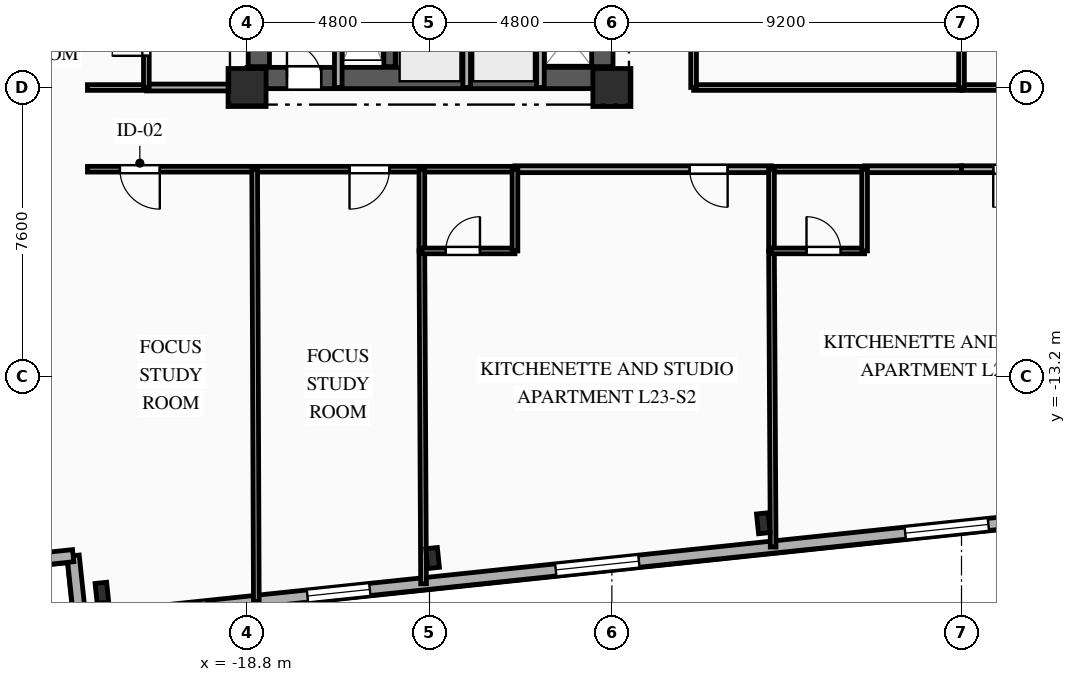
"""IFC4 building model, lengths in metres.
Left out: names, types, materials, properties, quantities, classifications, styles, units other than length and angle.
Written with IfcOpenShell. Run it as: python <this file> out.ifc"""

import sys

from ifc_helpers import new_model, si_unit, direction, frame, frame_2d, origin, origin_2d, place, context, subcontext, project, spatial, rectangle, i_section, extrude, element, fill, save


model = new_model("IFC4")
c1 = context("Model", 3, precision=1e-05, world=origin(), true_north=direction((0.0, 1.0)))
c2 = subcontext(c1, "Body", "Model", "MODEL_VIEW")
j1 = project(units=[si_unit("LENGTHUNIT", "METRE"), si_unit("PLANEANGLEUNIT", "RADIAN")], contexts=[c1])
p1 = place(None, origin())
s1 = spatial("IfcSite", under=j1, at=p1, CompositionType="ELEMENT")
p2 = place(p1, origin())
s2 = spatial("IfcBuilding", under=s1, at=p2, CompositionType="ELEMENT")
p3 = place(p2, frame((0.0, 0.0, 85.7)))
s3 = spatial("IfcBuildingStorey", under=s2, at=p3, CompositionType="ELEMENT", Elevation=85.7)
for number, where, z_axis, x_axis in (
    (1, (-18.8, -5.6, 0.0), (0.0, 0.0, 1.0), (1.0, 0.0, 0.0)),
    (2, (-9.2, -5.6, 0.0), (0.0, 0.0, 1.0), (1.0, 0.0, 0.0)),
):
    element("IfcColumn", number, at=place(p3, frame(where, z_axis=z_axis, x_axis=x_axis)), inside=s3, PredefinedType="COLUMN", context=c2, shape_type="SweptSolid", body=[
        extrude(rectangle(XDim=1.0, YDim=1.0, at=origin_2d()), origin(), (0.0, 0.0, 1.0), 3.35),
    ])
for number, where, z_axis, x_axis in (
    (3, (-22.619, -18.895, 0.0), (0.0, 0.0, 1.0), (0.995, 0.105, 0.0)),
    (4, (-13.917, -17.98, 0.0), (0.0, 0.0, 1.0), (0.995, 0.105, 0.0)),
    (5, (-5.215, -17.066, 0.0), (0.0, 0.0, 1.0), (0.995, 0.105, 0.0)),
):
    element("IfcColumn", number, at=place(p3, frame(where, z_axis=z_axis, x_axis=x_axis)), inside=s3, PredefinedType="COLUMN", context=c2, shape_type="SweptSolid", body=[
        extrude(i_section(OverallWidth=0.306, OverallDepth=0.524, WebThickness=0.021, FlangeThickness=0.04, FilletRadius=0.027, at=origin_2d()), origin(), (0.0, 0.0, 1.0), 3.35),
    ])
for number, where, z_axis, x_axis in (
    (6, (-23.198, -19.609, 0.0), (0.0, 0.0, 1.0), (-0.105, 0.995, 0.0)),
    (7, (-23.376, -17.919, 0.0), (0.0, 0.0, 1.0), (-0.995, -0.105, 0.0)),
):
    element("IfcWall", number, at=place(p3, frame(where, z_axis=z_axis, x_axis=x_axis)), inside=s3, PredefinedType="SOLIDWALL", context=c2, shape_type="SweptSolid", body=[
        extrude(rectangle(XDim=1.7, YDim=0.32, at=frame_2d((0.85, 0.0))), origin(), (0.0, 0.0, 1.0), 3.045),
    ])
p4 = place(p3, frame((30.307, -13.986, 0.0), z_axis=(0.0, 0.0, 1.0), x_axis=(-0.994521628355, -0.104531003701, 0.0)))
e8 = element("IfcWall", 8, at=p4, inside=s3, PredefinedType="SOLIDWALL", context=c2, shape_type="SweptSolid", body=[
    extrude(rectangle(XDim=53.8, YDim=0.32, at=frame_2d((26.9, 0.0))), origin(), (0.0, 0.0, 1.0), 3.045),
])
p5 = place(p4, frame((11.344, 0.0, 0.85)))
e9 = element("IfcOpeningElement", 9, at=p5, cuts=e8, PredefinedType="OPENING", context=c2, shape_type="SweptSolid", body=[
    extrude(rectangle(XDim=1.65, YDim=1.85, at=frame_2d((0.825, 0.925))), frame((0.0, 0.17, 0.0), z_axis=(0.0, -1.0, 0.0), x_axis=(1.0, 0.0, 0.0)), (0.0, 0.0, 1.0), 0.34),
])
p6 = place(p4, frame((20.516, 0.0, 0.85)))
e10 = element("IfcOpeningElement", 10, at=p6, cuts=e8, PredefinedType="OPENING", context=c2, shape_type="SweptSolid", body=[
    extrude(rectangle(XDim=2.2, YDim=1.85, at=frame_2d((1.1, 0.925))), frame((0.0, 0.17, 0.0), z_axis=(0.0, -1.0, 0.0), x_axis=(1.0, 0.0, 0.0)), (0.0, 0.0, 1.0), 0.34),
])
p7 = place(p4, frame((29.763, 0.0, 0.85)))
e11 = element("IfcOpeningElement", 11, at=p7, cuts=e8, PredefinedType="OPENING", context=c2, shape_type="SweptSolid", body=[
    extrude(rectangle(XDim=2.2, YDim=1.85, at=frame_2d((1.1, 0.925))), frame((0.0, 0.17, 0.0), z_axis=(0.0, -1.0, 0.0), x_axis=(1.0, 0.0, 0.0)), (0.0, 0.0, 1.0), 0.34),
])
p8 = place(p4, frame((39.01, 0.0, 0.85)))
e12 = element("IfcOpeningElement", 12, at=p8, cuts=e8, PredefinedType="OPENING", context=c2, shape_type="SweptSolid", body=[
    extrude(rectangle(XDim=2.2, YDim=1.85, at=frame_2d((1.1, 0.925))), frame((0.0, 0.17, 0.0), z_axis=(0.0, -1.0, 0.0), x_axis=(1.0, 0.0, 0.0)), (0.0, 0.0, 1.0), 0.34),
])
p9 = place(p4, frame((46.13, 0.0, 0.85)))
e13 = element("IfcOpeningElement", 13, at=p9, cuts=e8, PredefinedType="OPENING", context=c2, shape_type="SweptSolid", body=[
    extrude(rectangle(XDim=1.65, YDim=1.85, at=frame_2d((0.825, 0.925))), frame((0.0, 0.17, 0.0), z_axis=(0.0, -1.0, 0.0), x_axis=(1.0, 0.0, 0.0)), (0.0, 0.0, 1.0), 0.34),
])
p10 = place(p4, frame((50.453, 0.0, 0.85)))
e14 = element("IfcOpeningElement", 14, at=p10, cuts=e8, PredefinedType="OPENING", context=c2, shape_type="SweptSolid", body=[
    extrude(rectangle(XDim=1.65, YDim=1.85, at=frame_2d((0.825, 0.925))), frame((0.0, 0.17, 0.0), z_axis=(0.0, -1.0, 0.0), x_axis=(1.0, 0.0, 0.0)), (0.0, 0.0, 1.0), 0.34),
])
p11 = place(p3, frame((-18.8, -5.35, 0.0), z_axis=(0.0, 0.0, 1.0), x_axis=(1.0, 0.0, 0.0)))
e15 = element("IfcWall", 15, at=p11, inside=s3, PredefinedType="SHEAR", context=c2, shape_type="SweptSolid", body=[
    extrude(rectangle(XDim=9.6, YDim=0.56, at=frame_2d((4.8, 0.0))), origin(), (0.0, 0.0, 1.0), 3.045),
])
p12 = place(p11, frame((1.05, 0.0, 0.0)))
e16 = element("IfcOpeningElement", 16, at=p12, cuts=e15, PredefinedType="OPENING", context=c2, shape_type="SweptSolid", body=[
    extrude(rectangle(XDim=0.9, YDim=2.1, at=frame_2d((0.45, 1.05))), frame((0.0, 0.29, 0.0), z_axis=(0.0, -1.0, 0.0), x_axis=(1.0, 0.0, 0.0)), (0.0, 0.0, 1.0), 0.58),
])
p13 = place(p3, frame((-18.49, -5.05, 0.0), z_axis=(0.0, 0.0, 1.0), x_axis=(0.0, 1.0, 0.0)))
e17 = element("IfcWall", 17, at=p13, inside=s3, PredefinedType="SHEAR", context=c2, shape_type="SweptSolid", body=[
    extrude(rectangle(XDim=10.1, YDim=0.56, at=frame_2d((5.05, 0.0))), origin(), (0.0, 0.0, 1.0), 3.045),
])
p14 = place(p3, frame((-9.45, -5.05, 0.0), z_axis=(0.0, 0.0, 1.0), x_axis=(0.0, 1.0, 0.0)))
e18 = element("IfcWall", 18, at=p14, inside=s3, PredefinedType="SHEAR", context=c2, shape_type="SweptSolid", body=[
    extrude(rectangle(XDim=10.1, YDim=0.56, at=frame_2d((5.05, 0.0))), origin(), (0.0, 0.0, 1.0), 3.045),
])
p15 = place(p14, frame((7.175, 0.0, 0.0)))
e19 = element("IfcOpeningElement", 19, at=p15, cuts=e18, PredefinedType="OPENING", context=c2, shape_type="SweptSolid", body=[
    extrude(rectangle(XDim=0.9, YDim=2.1, at=frame_2d((0.45, 1.05))), frame((0.0, 0.29, 0.0), z_axis=(0.0, -1.0, 0.0), x_axis=(1.0, 0.0, 0.0)), (0.0, 0.0, 1.0), 0.58),
])
p16 = place(p14, frame((2.4, 0.0, 0.0)))
e20 = element("IfcOpeningElement", 20, at=p16, cuts=e18, PredefinedType="OPENING", context=c2, shape_type="SweptSolid", body=[
    extrude(rectangle(XDim=1.2, YDim=2.15, at=frame_2d((0.6, 1.075))), frame((0.0, 0.29, 0.0), z_axis=(0.0, -1.0, 0.0), x_axis=(1.0, 0.0, 0.0)), (0.0, 0.0, 1.0), 0.58),
])
p17 = place(p3, frame((-15.05, -5.05, 0.0), z_axis=(0.0, 0.0, 1.0), x_axis=(0.0, 1.0, 0.0)))
e21 = element("IfcWall", 21, at=p17, inside=s3, PredefinedType="SHEAR", context=c2, shape_type="SweptSolid", body=[
    extrude(rectangle(XDim=10.1, YDim=0.3, at=frame_2d((5.05, 0.0))), origin(), (0.0, 0.0, 1.0), 3.045),
])
p18 = place(p3, frame((-16.4, -5.6, 0.0), z_axis=(0.0, 0.0, 1.0), x_axis=(0.0, 1.0, 0.0)))
e22 = element("IfcWall", 22, at=p18, inside=s3, PredefinedType="PARTITIONING", context=c2, shape_type="SweptSolid", body=[
    extrude(rectangle(XDim=3.49, YDim=0.2, at=frame_2d((1.745, 0.0))), origin(), (0.0, 0.0, 1.0), 3.045),
])
for number, where, z_axis, x_axis in (
    (23, (-13.02, -5.6, 0.0), (0.0, 0.0, 1.0), (0.0, 1.0, 0.0)),
    (24, (-11.08, -5.6, 0.0), (0.0, 0.0, 1.0), (0.0, 1.0, 0.0)),
):
    element("IfcWall", number, at=place(p3, frame(where, z_axis=z_axis, x_axis=x_axis)), inside=s3, PredefinedType="PARTITIONING", context=c2, shape_type="SweptSolid", body=[
        extrude(rectangle(XDim=2.25, YDim=0.2, at=frame_2d((1.125, 0.0))), origin(), (0.0, 0.0, 1.0), 3.045),
    ])
p19 = place(p3, frame((-21.45, -5.6, 0.0), z_axis=(0.0, 0.0, 1.0), x_axis=(1.0, 0.0, 0.0)))
e25 = element("IfcWall", 25, at=p19, inside=s3, PredefinedType="PARTITIONING", context=c2, shape_type="SweptSolid", body=[
    extrude(rectangle(XDim=2.65, YDim=0.18, at=frame_2d((1.325, 0.0))), origin(), (0.0, 0.0, 1.0), 3.045),
])
p20 = place(p3, frame((-23.0, -5.6, 0.0), z_axis=(0.0, 0.0, 1.0), x_axis=(1.0, 0.0, 0.0)))
e26 = element("IfcWall", 26, at=p20, inside=s3, PredefinedType="PLUMBINGWALL", context=c2, shape_type="SweptSolid", body=[
    extrude(rectangle(XDim=1.55, YDim=0.15, at=frame_2d((0.775, 0.0))), origin(), (0.0, 0.0, 1.0), 3.045),
])
p21 = place(p3, frame((-18.6, -7.75, 0.0), z_axis=(0.0, 0.0, 1.0), x_axis=(-1.0, 0.0, 0.0)))
e27 = element("IfcWall", 27, at=p21, inside=s3, PredefinedType="PARTITIONING", context=c2, shape_type="SweptSolid", body=[
    extrude(rectangle(XDim=4.4, YDim=0.15, at=frame_2d((2.2, 0.0))), origin(), (0.0, 0.0, 1.0), 3.045),
])
p22 = place(p21, frame((2.496, 0.0, 0.0)))
e28 = element("IfcOpeningElement", 28, at=p22, cuts=e27, PredefinedType="OPENING", context=c2, shape_type="SweptSolid", body=[
    extrude(rectangle(XDim=1.05, YDim=2.15, at=frame_2d((0.525, 1.075))), frame((0.0, 0.085, 0.0), z_axis=(0.0, -1.0, 0.0), x_axis=(1.0, 0.0, 0.0)), (0.0, 0.0, 1.0), 0.17),
])
p23 = place(p3, frame((-14.2, -7.75, 0.0), z_axis=(0.0, 0.0, 1.0), x_axis=(-1.0, 0.0, 0.0)))
e29 = element("IfcWall", 29, at=p23, inside=s3, PredefinedType="PARTITIONING", context=c2, shape_type="SweptSolid", body=[
    extrude(rectangle(XDim=4.4, YDim=0.15, at=frame_2d((2.2, 0.0))), origin(), (0.0, 0.0, 1.0), 3.045),
])
p24 = place(p23, frame((0.854, 0.0, 0.0)))
e30 = element("IfcOpeningElement", 30, at=p24, cuts=e29, PredefinedType="OPENING", context=c2, shape_type="SweptSolid", body=[
    extrude(rectangle(XDim=1.05, YDim=2.15, at=frame_2d((0.525, 1.075))), frame((0.0, 0.085, 0.0), z_axis=(0.0, -1.0, 0.0), x_axis=(1.0, 0.0, 0.0)), (0.0, 0.0, 1.0), 0.17),
])
p25 = place(p3, frame((-5.0, -7.75, 0.0), z_axis=(0.0, 0.0, 1.0), x_axis=(-1.0, 0.0, 0.0)))
e31 = element("IfcWall", 31, at=p25, inside=s3, PredefinedType="PARTITIONING", context=c2, shape_type="SweptSolid", body=[
    extrude(rectangle(XDim=6.75, YDim=0.18, at=frame_2d((3.375, 0.0))), origin(), (0.0, 0.0, 1.0), 3.045),
])
p26 = place(p25, frame((1.154, 0.0, 0.0)))
e32 = element("IfcOpeningElement", 32, at=p26, cuts=e31, PredefinedType="OPENING", context=c2, shape_type="SweptSolid", body=[
    extrude(rectangle(XDim=1.0, YDim=2.15, at=frame_2d((0.5, 1.075))), frame((0.0, 0.1, 0.0), z_axis=(0.0, -1.0, 0.0), x_axis=(1.0, 0.0, 0.0)), (0.0, 0.0, 1.0), 0.2),
])
p27 = place(p3, frame((-11.75, -7.75, 0.0), z_axis=(0.0, 0.0, 1.0), x_axis=(-1.0, 0.0, 0.0)))
e33 = element("IfcWall", 33, at=p27, inside=s3, PredefinedType="PLUMBINGWALL", context=c2, shape_type="SweptSolid", body=[
    extrude(rectangle(XDim=2.45, YDim=0.15, at=frame_2d((1.225, 0.0))), origin(), (0.0, 0.0, 1.0), 3.045),
])
p28 = place(p3, frame((0.0, -7.75, 0.0), z_axis=(0.0, 0.0, 1.0), x_axis=(-1.0, 0.0, 0.0)))
e34 = element("IfcWall", 34, at=p28, inside=s3, PredefinedType="PARTITIONING", context=c2, shape_type="SweptSolid", body=[
    extrude(rectangle(XDim=2.55, YDim=0.18, at=frame_2d((1.275, 0.0))), origin(), (0.0, 0.0, 1.0), 3.045),
])
p29 = place(p3, frame((-2.55, -7.75, 0.0), z_axis=(0.0, 0.0, 1.0), x_axis=(-1.0, 0.0, 0.0)))
e35 = element("IfcWall", 35, at=p29, inside=s3, PredefinedType="PLUMBINGWALL", context=c2, shape_type="SweptSolid", body=[
    extrude(rectangle(XDim=2.45, YDim=0.15, at=frame_2d((1.225, 0.0))), origin(), (0.0, 0.0, 1.0), 3.045),
])
p30 = place(p3, frame((-7.05, -5.6, 0.0), z_axis=(0.0, 0.0, 1.0), x_axis=(1.0, 0.0, 0.0)))
e36 = element("IfcWall", 36, at=p30, inside=s3, PredefinedType="PARTITIONING", context=c2, shape_type="SweptSolid", body=[
    extrude(rectangle(XDim=7.05, YDim=0.15, at=frame_2d((3.525, 0.0))), origin(), (0.0, 0.0, 1.0), 2.53),
])
p31 = place(p3, frame((4.2, -7.75, 0.0), z_axis=(0.0, 0.0, 1.0), x_axis=(-1.0, 0.0, 0.0)))
e37 = element("IfcWall", 37, at=p31, inside=s3, PredefinedType="PARTITIONING", context=c2, shape_type="SweptSolid", body=[
    extrude(rectangle(XDim=4.2, YDim=0.18, at=frame_2d((2.1, 0.0))), origin(), (0.0, 0.0, 1.0), 3.045),
])
p32 = place(p31, frame((2.365, 0.0, 0.0)))
e38 = element("IfcOpeningElement", 38, at=p32, cuts=e37, PredefinedType="OPENING", context=c2, shape_type="SweptSolid", body=[
    extrude(rectangle(XDim=1.0, YDim=2.15, at=frame_2d((0.5, 1.075))), frame((0.0, 0.1, 0.0), z_axis=(0.0, -1.0, 0.0), x_axis=(1.0, 0.0, 0.0)), (0.0, 0.0, 1.0), 0.2),
])
p33 = place(p3, frame((0.0, -5.6, 0.0), z_axis=(0.0, 0.0, 1.0), x_axis=(1.0, 0.0, 0.0)))
e39 = element("IfcWall", 39, at=p33, inside=s3, PredefinedType="PARTITIONING", context=c2, shape_type="SweptSolid", body=[
    extrude(rectangle(XDim=7.05, YDim=0.15, at=frame_2d((3.525, 0.0))), origin(), (0.0, 0.0, 1.0), 2.53),
])
p34 = place(p33, frame((1.185, 0.0, 0.0)))
e40 = element("IfcOpeningElement", 40, at=p34, cuts=e39, PredefinedType="OPENING", context=c2, shape_type="SweptSolid", body=[
    extrude(rectangle(XDim=1.05, YDim=2.15, at=frame_2d((0.525, 1.075))), frame((0.0, 0.085, 0.0), z_axis=(0.0, -1.0, 0.0), x_axis=(1.0, 0.0, 0.0)), (0.0, 0.0, 1.0), 0.17),
])
p35 = place(p3, frame((-7.05, 8.5, 0.0), z_axis=(0.0, 0.0, 1.0), x_axis=(0.0, -1.0, 0.0)))
e41 = element("IfcWall", 41, at=p35, inside=s3, PredefinedType="PARTITIONING", context=c2, shape_type="SweptSolid", body=[
    extrude(rectangle(XDim=14.1, YDim=0.15, at=frame_2d((7.05, 0.0))), origin(), (0.0, 0.0, 1.0), 3.045),
])
p36 = place(p35, frame((8.011, 0.0, 0.0)))
e42 = element("IfcOpeningElement", 42, at=p36, cuts=e41, PredefinedType="OPENING", context=c2, shape_type="SweptSolid", body=[
    extrude(rectangle(XDim=1.05, YDim=2.15, at=frame_2d((0.525, 1.075))), frame((0.0, 0.085, 0.0), z_axis=(0.0, -1.0, 0.0), x_axis=(1.0, 0.0, 0.0)), (0.0, 0.0, 1.0), 0.17),
])
p37 = place(p3, frame((-21.45, -5.6, 0.0), z_axis=(0.0, 0.0, 1.0), x_axis=(0.0, 1.0, 0.0)))
e43 = element("IfcWall", 43, at=p37, inside=s3, PredefinedType="PLUMBINGWALL", context=c2, shape_type="SweptSolid", body=[
    extrude(rectangle(XDim=2.35, YDim=0.15, at=frame_2d((1.175, 0.0))), origin(), (0.0, 0.0, 1.0), 3.045),
])
p38 = place(p37, frame((0.834, 0.0, 0.0)))
e44 = element("IfcOpeningElement", 44, at=p38, cuts=e43, PredefinedType="OPENING", context=c2, shape_type="SweptSolid", body=[
    extrude(rectangle(XDim=0.9, YDim=2.1, at=frame_2d((0.45, 1.05))), frame((0.0, 0.085, 0.0), z_axis=(0.0, -1.0, 0.0), x_axis=(1.0, 0.0, 0.0)), (0.0, 0.0, 1.0), 0.17),
])
p39 = place(p3, frame((-18.6, -7.75, 0.0), z_axis=(0.0, 0.0, 1.0), x_axis=(0.003864456523, -0.99999253296, 0.0)))
e45 = element("IfcWall", 45, at=p39, inside=s3, PredefinedType="PARTITIONING", context=c2, shape_type="SweptSolid", body=[
    extrude(rectangle(XDim=11.372, YDim=0.15, at=frame_2d((5.686, 0.0))), origin(), (0.0, 0.0, 1.0), 3.045),
])
p40 = place(p3, frame((-14.2, -9.9, 0.0), z_axis=(0.0, 0.0, 1.0), x_axis=(0.005017078758, -0.999987414381, 0.0)))
e46 = element("IfcWall", 46, at=p40, inside=s3, PredefinedType="PARTITIONING", context=c2, shape_type="SweptSolid", body=[
    extrude(rectangle(XDim=8.759, YDim=0.15, at=frame_2d((4.379, 0.0))), origin(), (0.0, 0.0, 1.0), 3.045),
])
p41 = place(p3, frame((-14.2, -7.75, 0.0), z_axis=(0.0, 0.0, 1.0), x_axis=(0.0, -1.0, 0.0)))
e47 = element("IfcWall", 47, at=p41, inside=s3, PredefinedType="PLUMBINGWALL", context=c2, shape_type="SweptSolid", body=[
    extrude(rectangle(XDim=2.15, YDim=0.15, at=frame_2d((1.075, 0.0))), origin(), (0.0, 0.0, 1.0), 3.045),
])
p42 = place(p3, frame((-14.2, -9.9, 0.0), z_axis=(0.0, 0.0, 1.0), x_axis=(1.0, 0.0, 0.0)))
e48 = element("IfcWall", 48, at=p42, inside=s3, PredefinedType="PLUMBINGWALL", context=c2, shape_type="SweptSolid", body=[
    extrude(rectangle(XDim=2.45, YDim=0.15, at=frame_2d((1.225, 0.0))), origin(), (0.0, 0.0, 1.0), 3.045),
])
p43 = place(p42, frame((0.629, 0.0, 0.0)))
e49 = element("IfcOpeningElement", 49, at=p43, cuts=e48, PredefinedType="OPENING", context=c2, shape_type="SweptSolid", body=[
    extrude(rectangle(XDim=0.9, YDim=2.1, at=frame_2d((0.45, 1.05))), frame((0.0, 0.085, 0.0), z_axis=(0.0, -1.0, 0.0), x_axis=(1.0, 0.0, 0.0)), (0.0, 0.0, 1.0), 0.17),
])
p44 = place(p3, frame((-11.75, -9.9, 0.0), z_axis=(0.0, 0.0, 1.0), x_axis=(0.0, 1.0, 0.0)))
e50 = element("IfcWall", 50, at=p44, inside=s3, PredefinedType="PLUMBINGWALL", context=c2, shape_type="SweptSolid", body=[
    extrude(rectangle(XDim=2.15, YDim=0.15, at=frame_2d((1.075, 0.0))), origin(), (0.0, 0.0, 1.0), 3.045),
])
p45 = place(p3, frame((-5.0, -9.9, 0.0), z_axis=(0.0, 0.0, 1.0), x_axis=(0.005639538101, -0.999984097679, 0.0)))
e51 = element("IfcWall", 51, at=p45, inside=s3, PredefinedType="PARTITIONING", context=c2, shape_type="SweptSolid", body=[
    extrude(rectangle(XDim=7.792, YDim=0.15, at=frame_2d((3.896, 0.0))), origin(), (0.0, 0.0, 1.0), 3.045),
])
p46 = place(p3, frame((-5.0, -7.75, 0.0), z_axis=(0.0, 0.0, 1.0), x_axis=(0.0, -1.0, 0.0)))
e52 = element("IfcWall", 52, at=p46, inside=s3, PredefinedType="PLUMBINGWALL", context=c2, shape_type="SweptSolid", body=[
    extrude(rectangle(XDim=2.15, YDim=0.15, at=frame_2d((1.075, 0.0))), origin(), (0.0, 0.0, 1.0), 3.045),
])
p47 = place(p3, frame((-5.0, -9.9, 0.0), z_axis=(0.0, 0.0, 1.0), x_axis=(1.0, 0.0, 0.0)))
e53 = element("IfcWall", 53, at=p47, inside=s3, PredefinedType="PLUMBINGWALL", context=c2, shape_type="SweptSolid", body=[
    extrude(rectangle(XDim=2.45, YDim=0.15, at=frame_2d((1.225, 0.0))), origin(), (0.0, 0.0, 1.0), 3.045),
])
p48 = place(p47, frame((0.921, 0.0, 0.0)))
e54 = element("IfcOpeningElement", 54, at=p48, cuts=e53, PredefinedType="OPENING", context=c2, shape_type="SweptSolid", body=[
    extrude(rectangle(XDim=0.9, YDim=2.1, at=frame_2d((0.45, 1.05))), frame((0.0, 0.085, 0.0), z_axis=(0.0, -1.0, 0.0), x_axis=(1.0, 0.0, 0.0)), (0.0, 0.0, 1.0), 0.17),
])
p49 = place(p3, frame((-2.55, -9.9, 0.0), z_axis=(0.0, 0.0, 1.0), x_axis=(0.0, 1.0, 0.0)))
e55 = element("IfcWall", 55, at=p49, inside=s3, PredefinedType="PLUMBINGWALL", context=c2, shape_type="SweptSolid", body=[
    extrude(rectangle(XDim=2.15, YDim=0.15, at=frame_2d((1.075, 0.0))), origin(), (0.0, 0.0, 1.0), 3.045),
])
p50 = place(p3, frame((0.0, 1.45, 0.0), z_axis=(0.0, 0.0, 1.0), x_axis=(0.0, -1.0, 0.0)))
e56 = element("IfcWall", 56, at=p50, inside=s3, PredefinedType="PARTITIONING", context=c2, shape_type="SweptSolid", body=[
    extrude(rectangle(XDim=7.05, YDim=0.15, at=frame_2d((3.525, 0.0))), origin(), (0.0, 0.0, 1.0), 3.045),
])
p51 = place(p7, origin())
e57 = element("IfcWindow", 57, at=p51, inside=s3, PartitioningType="SINGLE_PANEL", PredefinedType="WINDOW", context=c2, shape_type="SweptSolid", body=[
    extrude(rectangle(XDim=2.2, YDim=1.85, at=frame_2d((1.1, 0.925))), frame((0.0, 0.03, 0.0), z_axis=(0.0, -1.0, 0.0), x_axis=(1.0, 0.0, 0.0)), (0.0, 0.0, 1.0), 0.06),
])
fill(e11, e57)
p52 = place(p8, origin())
e58 = element("IfcWindow", 58, at=p52, inside=s3, PartitioningType="SINGLE_PANEL", PredefinedType="WINDOW", context=c2, shape_type="SweptSolid", body=[
    extrude(rectangle(XDim=2.2, YDim=1.85, at=frame_2d((1.1, 0.925))), frame((0.0, 0.03, 0.0), z_axis=(0.0, -1.0, 0.0), x_axis=(1.0, 0.0, 0.0)), (0.0, 0.0, 1.0), 0.06),
])
fill(e12, e58)
p53 = place(p9, origin())
e59 = element("IfcWindow", 59, at=p53, inside=s3, PartitioningType="SINGLE_PANEL", PredefinedType="WINDOW", context=c2, shape_type="SweptSolid", body=[
    extrude(rectangle(XDim=1.65, YDim=1.85, at=frame_2d((0.825, 0.925))), frame((0.0, 0.03, 0.0), z_axis=(0.0, -1.0, 0.0), x_axis=(1.0, 0.0, 0.0)), (0.0, 0.0, 1.0), 0.06),
])
fill(e13, e59)
p54 = place(p12, origin())
e60 = element("IfcDoor", 60, at=p54, inside=s3, OperationType="SINGLE_SWING_LEFT", PredefinedType="DOOR", context=c2, shape_type="SweptSolid", body=[
    extrude(rectangle(XDim=0.9, YDim=2.1, at=frame_2d((0.45, 1.05))), frame((0.0, 0.025, 0.0), z_axis=(0.0, -1.0, 0.0), x_axis=(1.0, 0.0, 0.0)), (0.0, 0.0, 1.0), 0.05),
])
fill(e16, e60)
p55 = place(p22, origin())
e61 = element("IfcDoor", 61, at=p55, inside=s3, OperationType="SINGLE_SWING_LEFT", PredefinedType="DOOR", context=c2, shape_type="SweptSolid", body=[
    extrude(rectangle(XDim=1.05, YDim=2.15, at=frame_2d((0.525, 1.075))), frame((0.0, 0.025, 0.0), z_axis=(0.0, -1.0, 0.0), x_axis=(1.0, 0.0, 0.0)), (0.0, 0.0, 1.0), 0.05),
])
fill(e28, e61)
p56 = place(p24, origin())
e62 = element("IfcDoor", 62, at=p56, inside=s3, OperationType="SINGLE_SWING_RIGHT", PredefinedType="DOOR", context=c2, shape_type="SweptSolid", body=[
    extrude(rectangle(XDim=1.05, YDim=2.15, at=frame_2d((0.525, 1.075))), frame((0.0, 0.025, 0.0), z_axis=(0.0, -1.0, 0.0), x_axis=(1.0, 0.0, 0.0)), (0.0, 0.0, 1.0), 0.05),
])
fill(e30, e62)
p57 = place(p26, origin())
e63 = element("IfcDoor", 63, at=p57, inside=s3, OperationType="SINGLE_SWING_LEFT", PredefinedType="DOOR", context=c2, shape_type="SweptSolid", body=[
    extrude(rectangle(XDim=1.0, YDim=2.15, at=frame_2d((0.5, 1.075))), frame((0.0, 0.025, 0.0), z_axis=(0.0, -1.0, 0.0), x_axis=(1.0, 0.0, 0.0)), (0.0, 0.0, 1.0), 0.05),
])
fill(e32, e63)
p58 = place(p32, origin())
e64 = element("IfcDoor", 64, at=p58, inside=s3, OperationType="SINGLE_SWING_RIGHT", PredefinedType="DOOR", context=c2, shape_type="SweptSolid", body=[
    extrude(rectangle(XDim=1.0, YDim=2.15, at=frame_2d((0.5, 1.075))), frame((0.0, 0.025, 0.0), z_axis=(0.0, -1.0, 0.0), x_axis=(1.0, 0.0, 0.0)), (0.0, 0.0, 1.0), 0.05),
])
fill(e38, e64)
p59 = place(p38, origin())
e65 = element("IfcDoor", 65, at=p59, inside=s3, OperationType="SINGLE_SWING_LEFT", PredefinedType="DOOR", context=c2, shape_type="SweptSolid", body=[
    extrude(rectangle(XDim=0.9, YDim=2.1, at=frame_2d((0.45, 1.05))), frame((0.0, 0.025, 0.0), z_axis=(0.0, -1.0, 0.0), x_axis=(1.0, 0.0, 0.0)), (0.0, 0.0, 1.0), 0.05),
])
fill(e44, e65)
p60 = place(p43, origin())
e66 = element("IfcDoor", 66, at=p60, inside=s3, OperationType="SINGLE_SWING_RIGHT", PredefinedType="DOOR", context=c2, shape_type="SweptSolid", body=[
    extrude(rectangle(XDim=0.9, YDim=2.1, at=frame_2d((0.45, 1.05))), frame((0.0, 0.025, 0.0), z_axis=(0.0, -1.0, 0.0), x_axis=(1.0, 0.0, 0.0)), (0.0, 0.0, 1.0), 0.05),
])
fill(e49, e66)
p61 = place(p48, origin())
e67 = element("IfcDoor", 67, at=p61, inside=s3, OperationType="SINGLE_SWING_LEFT", PredefinedType="DOOR", context=c2, shape_type="SweptSolid", body=[
    extrude(rectangle(XDim=0.9, YDim=2.1, at=frame_2d((0.45, 1.05))), frame((0.0, 0.025, 0.0), z_axis=(0.0, -1.0, 0.0), x_axis=(1.0, 0.0, 0.0)), (0.0, 0.0, 1.0), 0.05),
])
fill(e54, e67)
save(model, sys.argv[1])
